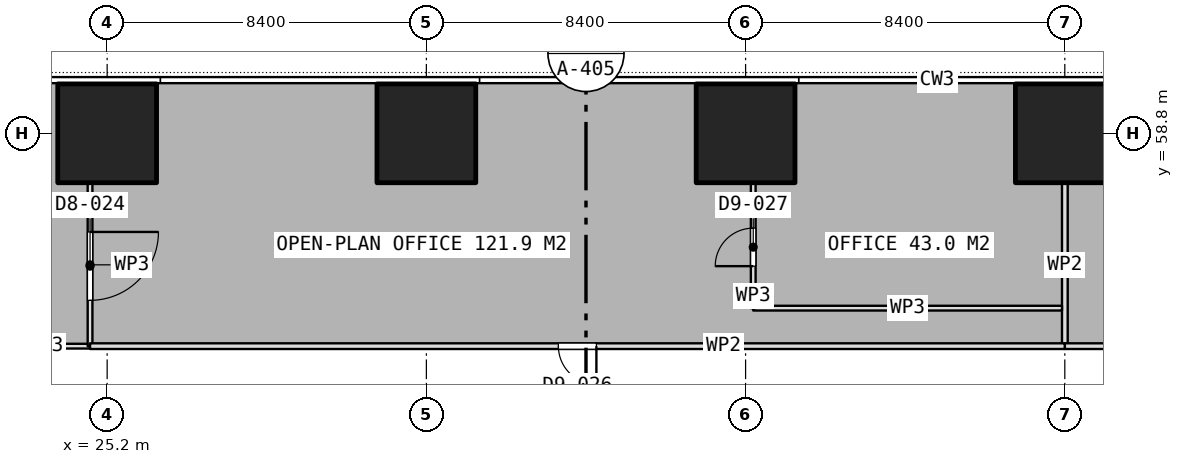
"""IFC4 building model, lengths in metres.
Left out: names, types, materials, properties, quantities, classifications, styles, units other than length and angle.
Written with IfcOpenShell. Run it as: python <this file> out.ifc"""

import sys

from ifc_helpers import new_model, si_unit, direction, frame, frame_2d, origin, origin_2d, place, context, subcontext, project, spatial, rectangle, extrude, element, fill, save


model = new_model("IFC4")
c1 = context("Model", 3, precision=1e-05, world=origin(), true_north=direction((0.0, 1.0)))
c2 = subcontext(c1, "Body", "Model", "MODEL_VIEW")
j1 = project(units=[si_unit("LENGTHUNIT", "METRE"), si_unit("PLANEANGLEUNIT", "RADIAN")], contexts=[c1])
p1 = place(None, origin())
s1 = spatial("IfcSite", under=j1, at=p1, CompositionType="ELEMENT")
p2 = place(p1, origin())
s2 = spatial("IfcBuilding", under=s1, at=p2, CompositionType="ELEMENT")
p3 = place(p2, frame((0.0, 0.0, 25.4)))
s3 = spatial("IfcBuildingStorey", under=s2, at=p3, CompositionType="ELEMENT", Elevation=25.4)
for number, where, z_axis, x_axis in (
    (1, (25.2, 58.8, 0.0), (0.0, 0.0, 1.0), (1.0, 0.0, 0.0)),
    (2, (33.6, 58.8, 0.0), (0.0, 0.0, 1.0), (1.0, 0.0, 0.0)),
    (3, (42.0, 58.8, 0.0), (0.0, 0.0, 1.0), (1.0, 0.0, 0.0)),
    (4, (50.4, 58.8, 0.0), (0.0, 0.0, 1.0), (1.0, 0.0, 0.0)),
):
    element("IfcColumn", number, at=place(p3, frame(where, z_axis=z_axis, x_axis=x_axis)), inside=s3, PredefinedType="COLUMN", context=c2, shape_type="SweptSolid", body=[
        extrude(rectangle(XDim=2.6, YDim=2.6, at=origin_2d()), origin(), (0.0, 0.0, 1.0), 3.75),
    ])
p4 = place(p3, frame((50.401, 53.2, 0.0), z_axis=(0.0, 0.0, 1.0), x_axis=(0.0, 1.0, 0.0)))
e5 = element("IfcWall", 5, at=p4, inside=s3, PredefinedType="PARTITIONING", context=c2, shape_type="SweptSolid", body=[
    extrude(rectangle(XDim=4.28, YDim=0.15, at=frame_2d((2.14, 0.0))), origin(), (0.0, 0.0, 1.0), 3.5),
])
p5 = place(p3, frame((53.2, 53.2, 0.0), z_axis=(0.0, 0.0, 1.0), x_axis=(-1.0, 0.0, 0.0)))
e6 = element("IfcWall", 6, at=p5, inside=s3, PredefinedType="PARTITIONING", context=c2, shape_type="SweptSolid", body=[
    extrude(rectangle(XDim=2.799, YDim=0.15, at=frame_2d((1.399, 0.0))), origin(), (0.0, 0.0, 1.0), 3.5),
])
p6 = place(p3, frame((50.326, 54.2, 0.0), z_axis=(0.0, 0.0, 1.0), x_axis=(-1.0, 0.0, 0.0)))
e7 = element("IfcWall", 7, at=p6, inside=s3, PredefinedType="PARTITIONING", context=c2, shape_type="SweptSolid", body=[
    extrude(rectangle(XDim=8.125, YDim=0.125, at=frame_2d((4.062, 0.0))), origin(), (0.0, 0.0, 1.0), 3.5),
])
p7 = place(p3, frame((42.201, 54.2, 0.0), z_axis=(0.0, 0.0, 1.0), x_axis=(0.0, 1.0, 0.0)))
e8 = element("IfcWall", 8, at=p7, inside=s3, PredefinedType="PARTITIONING", context=c2, shape_type="SweptSolid", body=[
    extrude(rectangle(XDim=3.28, YDim=0.125, at=frame_2d((1.64, 0.0))), origin(), (0.0, 0.0, 1.0), 3.5),
])
p8 = place(p7, frame((1.105, 0.0, 0.0)))
e9 = element("IfcOpeningElement", 9, at=p8, cuts=e8, PredefinedType="OPENING", context=c2, shape_type="SweptSolid", body=[
    extrude(rectangle(XDim=1.0, YDim=2.1, at=frame_2d((0.5, 1.05))), frame((0.0, 0.073, 0.0), z_axis=(0.0, -1.0, 0.0), x_axis=(1.0, 0.0, 0.0)), (0.0, 0.0, 1.0), 0.145),
])
p9 = place(p3, frame((24.75, 53.2, 0.0), z_axis=(0.0, 0.0, 1.0), x_axis=(-1.0, 0.0, 0.0)))
e10 = element("IfcWall", 10, at=p9, inside=s3, PredefinedType="PARTITIONING", context=c2, shape_type="SweptSolid", body=[
    extrude(rectangle(XDim=2.35, YDim=0.125, at=frame_2d((1.175, 0.0))), origin(), (0.0, 0.0, 1.0), 3.5),
])
p10 = place(p3, frame((24.75, 57.48, 0.0), z_axis=(0.0, 0.0, 1.0), x_axis=(0.0, -1.0, 0.0)))
e11 = element("IfcWall", 11, at=p10, inside=s3, PredefinedType="PARTITIONING", context=c2, shape_type="SweptSolid", body=[
    extrude(rectangle(XDim=4.28, YDim=0.125, at=frame_2d((2.14, 0.0))), origin(), (0.0, 0.0, 1.0), 3.5),
])
p11 = place(p10, frame((1.275, 0.0, 0.0)))
e12 = element("IfcOpeningElement", 12, at=p11, cuts=e11, PredefinedType="OPENING", context=c2, shape_type="SweptSolid", body=[
    extrude(rectangle(XDim=1.8, YDim=2.1, at=frame_2d((0.9, 1.05))), frame((0.0, 0.073, 0.0), z_axis=(0.0, -1.0, 0.0), x_axis=(1.0, 0.0, 0.0)), (0.0, 0.0, 1.0), 0.145),
])
p12 = place(p3, frame((50.399, 53.2, 0.0), z_axis=(0.0, 0.0, 1.0), x_axis=(-1.0, 0.0, 0.0)))
e13 = element("IfcWall", 13, at=p12, inside=s3, PredefinedType="PARTITIONING", context=c2, shape_type="SweptSolid", body=[
    extrude(rectangle(XDim=25.649, YDim=0.15, at=frame_2d((12.824, 0.0))), origin(), (0.0, 0.0, 1.0), 3.5),
])
p13 = place(p12, frame((12.325, 0.0, 0.0)))
e14 = element("IfcOpeningElement", 14, at=p13, cuts=e13, PredefinedType="OPENING", context=c2, shape_type="SweptSolid", body=[
    extrude(rectangle(XDim=1.0, YDim=2.1, at=frame_2d((0.5, 1.05))), frame((0.0, 0.085, 0.0), z_axis=(0.0, -1.0, 0.0), x_axis=(1.0, 0.0, 0.0)), (0.0, 0.0, 1.0), 0.17),
])
p14 = place(p8, origin())
e15 = element("IfcDoor", 15, at=p14, inside=s3, OperationType="SINGLE_SWING_LEFT", PredefinedType="DOOR", context=c2, shape_type="SweptSolid", body=[
    extrude(rectangle(XDim=1.0, YDim=2.1, at=frame_2d((0.5, 1.05))), frame((0.0, 0.025, 0.0), z_axis=(0.0, -1.0, 0.0), x_axis=(1.0, 0.0, 0.0)), (0.0, 0.0, 1.0), 0.05),
])
fill(e9, e15)
p15 = place(p11, origin())
e16 = element("IfcDoor", 16, at=p15, inside=s3, OperationType="DOUBLE_DOOR_SINGLE_SWING", PredefinedType="DOOR", context=c2, shape_type="SweptSolid", body=[
    extrude(rectangle(XDim=1.8, YDim=2.1, at=frame_2d((0.9, 1.05))), frame((0.0, 0.025, 0.0), z_axis=(0.0, -1.0, 0.0), x_axis=(1.0, 0.0, 0.0)), (0.0, 0.0, 1.0), 0.05),
])
fill(e12, e16)
p16 = place(p13, origin())
e17 = element("IfcDoor", 17, at=p16, inside=s3, OperationType="SINGLE_SWING_LEFT", PredefinedType="DOOR", context=c2, shape_type="SweptSolid", body=[
    extrude(rectangle(XDim=1.0, YDim=2.1, at=frame_2d((0.5, 1.05))), frame((0.0, 0.025, 0.0), z_axis=(0.0, -1.0, 0.0), x_axis=(1.0, 0.0, 0.0)), (0.0, 0.0, 1.0), 0.05),
])
fill(e14, e17)
save(model, sys.argv[1])
